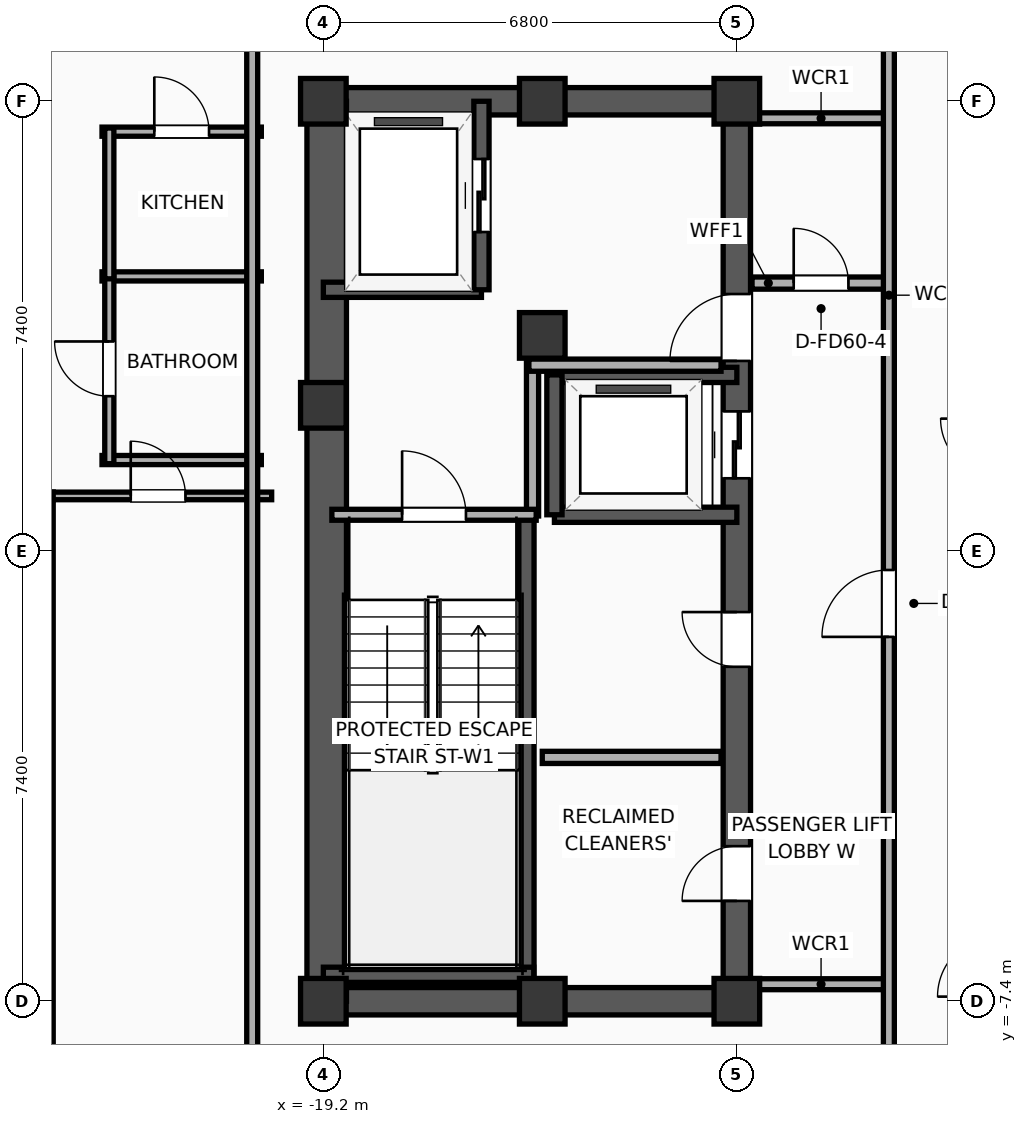
"""IFC4 building model, lengths in metres.
Left out: names, types, materials, properties, quantities, classifications, styles, units other than length and angle.
Written with IfcOpenShell. Run it as: python <this file> out.ifc"""

import sys

from ifc_helpers import new_model, si_unit, direction, frame, frame_2d, origin, origin_2d, place, context, subcontext, project, spatial, rectangle, extrude, element, fill, save


model = new_model("IFC4")
c1 = context("Model", 3, precision=1e-05, world=origin(), true_north=direction((0.0, 1.0)))
c2 = subcontext(c1, "Body", "Model", "MODEL_VIEW")
j1 = project(units=[si_unit("LENGTHUNIT", "METRE"), si_unit("PLANEANGLEUNIT", "RADIAN")], contexts=[c1])
p1 = place(None, origin())
s1 = spatial("IfcSite", under=j1, at=p1, CompositionType="ELEMENT")
p2 = place(p1, origin())
s2 = spatial("IfcBuilding", under=s1, at=p2, CompositionType="ELEMENT")
p3 = place(p2, frame((0.0, 0.0, 299.0)))
s3 = spatial("IfcBuildingStorey", under=s2, at=p3, CompositionType="ELEMENT", Elevation=299.0)
for number, where, z_axis, x_axis in (
    (1, (-19.2, -7.4, 0.0), (0.0, 0.0, 1.0), (1.0, 0.0, 0.0)),
    (2, (-19.2, 2.4, 0.0), (0.0, 0.0, 1.0), (1.0, 0.0, 0.0)),
    (3, (-19.2, 7.4, 0.0), (0.0, 0.0, 1.0), (1.0, 0.0, 0.0)),
    (4, (-15.6, -7.4, 0.0), (0.0, 0.0, 1.0), (1.0, 0.0, 0.0)),
    (5, (-15.6, 7.4, 0.0), (0.0, 0.0, 1.0), (1.0, 0.0, 0.0)),
    (6, (-12.4, -7.4, 0.0), (0.0, 0.0, 1.0), (1.0, 0.0, 0.0)),
    (7, (-15.6, 3.55, 0.0), (0.0, 0.0, 1.0), (1.0, 0.0, 0.0)),
    (8, (-12.4, 7.4, 0.0), (0.0, 0.0, 1.0), (1.0, 0.0, 0.0)),
):
    element("IfcColumn", number, at=place(p3, frame(where, z_axis=z_axis, x_axis=x_axis)), inside=s3, PredefinedType="COLUMN", context=c2, shape_type="SweptSolid", body=[
        extrude(rectangle(XDim=0.75, YDim=0.75, at=origin_2d()), origin(), (0.0, 0.0, 1.0), 3.9),
    ])
for number, where, z_axis, x_axis in (
    (9, (-19.425, -7.4, 0.0), (0.0, 0.0, 1.0), (1.0, 0.0, 0.0)),
    (10, (-19.425, 7.4, 0.0), (0.0, 0.0, 1.0), (1.0, 0.0, 0.0)),
):
    element("IfcWall", number, at=place(p3, frame(where, z_axis=z_axis, x_axis=x_axis)), inside=s3, PredefinedType="SHEAR", context=c2, shape_type="SweptSolid", body=[
        extrude(rectangle(XDim=7.25, YDim=0.45, at=frame_2d((3.625, 0.0))), origin(), (0.0, 0.0, 1.0), 3.635),
    ])
p4 = place(p3, frame((-19.145, -7.4, 0.0), z_axis=(0.0, 0.0, 1.0), x_axis=(0.0, 1.0, 0.0)))
e11 = element("IfcWall", 11, at=p4, inside=s3, PredefinedType="SHEAR", context=c2, shape_type="SweptSolid", body=[
    extrude(rectangle(XDim=14.8, YDim=0.65, at=frame_2d((7.4, 0.0))), origin(), (0.0, 0.0, 1.0), 3.635),
])
p5 = place(p3, frame((-12.4, -7.4, 0.0), z_axis=(0.0, 0.0, 1.0), x_axis=(0.0, 1.0, 0.0)))
e12 = element("IfcWall", 12, at=p5, inside=s3, PredefinedType="SHEAR", context=c2, shape_type="SweptSolid", body=[
    extrude(rectangle(XDim=14.8, YDim=0.45, at=frame_2d((7.4, 0.0))), origin(), (0.0, 0.0, 1.0), 3.635),
])
p6 = place(p5, frame((8.6, 0.0, 0.0)))
e13 = element("IfcOpeningElement", 13, at=p6, cuts=e12, PredefinedType="OPENING", context=c2, shape_type="SweptSolid", body=[
    extrude(rectangle(XDim=1.1, YDim=2.05, at=frame_2d((0.55, 1.025))), frame((0.0, 0.235, 0.0), z_axis=(0.0, -1.0, 0.0), x_axis=(1.0, 0.0, 0.0)), (0.0, 0.0, 1.0), 0.47),
])
p7 = place(p5, frame((10.53, 0.0, 0.0)))
e14 = element("IfcOpeningElement", 14, at=p7, cuts=e12, PredefinedType="OPENING", context=c2, shape_type="SweptSolid", body=[
    extrude(rectangle(XDim=1.1, YDim=2.05, at=frame_2d((0.55, 1.025))), frame((0.0, 0.235, 0.0), z_axis=(0.0, -1.0, 0.0), x_axis=(1.0, 0.0, 0.0)), (0.0, 0.0, 1.0), 0.47),
])
p8 = place(p5, frame((1.65, 0.0, 0.0)))
e15 = element("IfcOpeningElement", 15, at=p8, cuts=e12, PredefinedType="OPENING", context=c2, shape_type="SweptSolid", body=[
    extrude(rectangle(XDim=0.9, YDim=2.05, at=frame_2d((0.45, 1.025))), frame((0.0, 0.235, 0.0), z_axis=(0.0, -1.0, 0.0), x_axis=(1.0, 0.0, 0.0)), (0.0, 0.0, 1.0), 0.47),
])
p9 = place(p5, frame((5.5, 0.0, 0.0)))
e16 = element("IfcOpeningElement", 16, at=p9, cuts=e12, PredefinedType="OPENING", context=c2, shape_type="SweptSolid", body=[
    extrude(rectangle(XDim=0.9, YDim=2.05, at=frame_2d((0.45, 1.025))), frame((0.0, 0.235, 0.0), z_axis=(0.0, -1.0, 0.0), x_axis=(1.0, 0.0, 0.0)), (0.0, 0.0, 1.0), 0.47),
])
p10 = place(p3, frame((-15.86, -7.085, 0.0), z_axis=(0.0, 0.0, 1.0), x_axis=(0.0, 1.0, 0.0)))
e17 = element("IfcWall", 17, at=p10, inside=s3, PredefinedType="SOLIDWALL", context=c2, shape_type="SweptSolid", body=[
    extrude(rectangle(XDim=7.685, YDim=0.25, at=frame_2d((3.843, 0.0))), origin(), (0.0, 0.0, 1.0), 3.635),
])
p11 = place(p3, frame((-19.2, -6.965, 0.0), z_axis=(0.0, 0.0, 1.0), x_axis=(1.0, 0.0, 0.0)))
e18 = element("IfcWall", 18, at=p11, inside=s3, PredefinedType="SOLIDWALL", context=c2, shape_type="SweptSolid", body=[
    extrude(rectangle(XDim=3.46, YDim=0.25, at=frame_2d((1.73, 0.0))), origin(), (0.0, 0.0, 1.0), 3.635),
])
p12 = place(p3, frame((-19.2, 4.3, 0.0), z_axis=(0.0, 0.0, 1.0), x_axis=(1.0, 0.0, 0.0)))
e19 = element("IfcWall", 19, at=p12, inside=s3, PredefinedType="SOLIDWALL", context=c2, shape_type="SweptSolid", body=[
    extrude(rectangle(XDim=2.6, YDim=0.25, at=frame_2d((1.3, 0.0))), origin(), (0.0, 0.0, 1.0), 3.635),
])
p13 = place(p3, frame((-16.6, 4.3, 0.0), z_axis=(0.0, 0.0, 1.0), x_axis=(0.0, 1.0, 0.0)))
e20 = element("IfcWall", 20, at=p13, inside=s3, PredefinedType="SOLIDWALL", context=c2, shape_type="SweptSolid", body=[
    extrude(rectangle(XDim=3.1, YDim=0.25, at=frame_2d((1.55, 0.0))), origin(), (0.0, 0.0, 1.0), 3.635),
])
p14 = place(p13, frame((0.95, 0.0, 0.0)))
e21 = element("IfcOpeningElement", 21, at=p14, cuts=e20, PredefinedType="OPENING", context=c2, shape_type="SweptSolid", body=[
    extrude(rectangle(XDim=1.2, YDim=2.05, at=frame_2d((0.6, 1.025))), frame((0.0, 0.135, 0.0), z_axis=(0.0, -1.0, 0.0), x_axis=(1.0, 0.0, 0.0)), (0.0, 0.0, 1.0), 0.27),
])
for number, where, z_axis, x_axis in (
    (22, (-15.4, 0.6, 0.0), (0.0, 0.0, 1.0), (1.0, 0.0, 0.0)),
    (23, (-12.4, 2.9, 0.0), (0.0, 0.0, 1.0), (-1.0, 0.0, 0.0)),
):
    element("IfcWall", number, at=place(p3, frame(where, z_axis=z_axis, x_axis=x_axis)), inside=s3, PredefinedType="SOLIDWALL", context=c2, shape_type="SweptSolid", body=[
        extrude(rectangle(XDim=3.0, YDim=0.25, at=frame_2d((1.5, 0.0))), origin(), (0.0, 0.0, 1.0), 3.635),
    ])
p15 = place(p3, frame((-15.4, 2.9, 0.0), z_axis=(0.0, 0.0, 1.0), x_axis=(0.0, -1.0, 0.0)))
e24 = element("IfcWall", 24, at=p15, inside=s3, PredefinedType="SOLIDWALL", context=c2, shape_type="SweptSolid", body=[
    extrude(rectangle(XDim=2.3, YDim=0.25, at=frame_2d((1.15, 0.0))), origin(), (0.0, 0.0, 1.0), 3.635),
])
p16 = place(p3, frame((-15.76, 0.58, 0.0), z_axis=(0.0, 0.0, 1.0), x_axis=(0.0, 1.0, 0.0)))
e25 = element("IfcWall", 25, at=p16, inside=s3, PredefinedType="PARTITIONING", context=c2, shape_type="SweptSolid", body=[
    extrude(rectangle(XDim=2.52, YDim=0.2, at=frame_2d((1.26, 0.0))), origin(), (0.0, 0.0, 1.0), 3.635),
])
p17 = place(p3, frame((-15.82, 3.06, 0.0), z_axis=(0.0, 0.0, 1.0), x_axis=(1.0, 0.0, 0.0)))
e26 = element("IfcWall", 26, at=p17, inside=s3, PredefinedType="PARTITIONING", context=c2, shape_type="SweptSolid", body=[
    extrude(rectangle(XDim=3.16, YDim=0.2, at=frame_2d((1.58, 0.0))), origin(), (0.0, 0.0, 1.0), 3.635),
])
p18 = place(p3, frame((-19.06, 0.6, 0.0), z_axis=(0.0, 0.0, 1.0), x_axis=(1.0, 0.0, 0.0)))
e27 = element("IfcWall", 27, at=p18, inside=s3, PredefinedType="PARTITIONING", context=c2, shape_type="SweptSolid", body=[
    extrude(rectangle(XDim=3.36, YDim=0.18, at=frame_2d((1.68, 0.0))), origin(), (0.0, 0.0, 1.0), 3.635),
])
p19 = place(p18, frame((1.155, 0.0, 0.0)))
e28 = element("IfcOpeningElement", 28, at=p19, cuts=e27, PredefinedType="OPENING", context=c2, shape_type="SweptSolid", body=[
    extrude(rectangle(XDim=1.05, YDim=2.05, at=frame_2d((0.525, 1.025))), frame((0.0, 0.1, 0.0), z_axis=(0.0, -1.0, 0.0), x_axis=(1.0, 0.0, 0.0)), (0.0, 0.0, 1.0), 0.2),
])
p20 = place(p3, frame((-15.6, -3.39, 0.0), z_axis=(0.0, 0.0, 1.0), x_axis=(1.0, 0.0, 0.0)))
e29 = element("IfcWall", 29, at=p20, inside=s3, PredefinedType="PARTITIONING", context=c2, shape_type="SweptSolid", body=[
    extrude(rectangle(XDim=2.94, YDim=0.2, at=frame_2d((1.47, 0.0))), origin(), (0.0, 0.0, 1.0), 3.635),
])
p21 = place(p3, frame((-12.15, 4.41, 0.0), z_axis=(0.0, 0.0, 1.0), x_axis=(1.0, 0.0, 0.0)))
e30 = element("IfcWall", 30, at=p21, inside=s3, PredefinedType="PARTITIONING", context=c2, shape_type="SweptSolid", body=[
    extrude(rectangle(XDim=2.27, YDim=0.2, at=frame_2d((1.135, 0.0))), origin(), (0.0, 0.0, 1.0), 3.635),
])
p22 = place(p21, frame((0.685, 0.0, 0.0)))
e31 = element("IfcOpeningElement", 31, at=p22, cuts=e30, PredefinedType="OPENING", context=c2, shape_type="SweptSolid", body=[
    extrude(rectangle(XDim=0.9, YDim=2.05, at=frame_2d((0.45, 1.025))), frame((0.0, 0.11, 0.0), z_axis=(0.0, -1.0, 0.0), x_axis=(1.0, 0.0, 0.0)), (0.0, 0.0, 1.0), 0.22),
])
for number, where, z_axis, x_axis in (
    (32, (-12.15, 7.12, 0.0), (0.0, 0.0, 1.0), (1.0, 0.0, 0.0)),
    (33, (-12.15, -7.12, 0.0), (0.0, 0.0, 1.0), (1.0, 0.0, 0.0)),
):
    element("IfcWall", number, at=place(p3, frame(where, z_axis=z_axis, x_axis=x_axis)), inside=s3, PredefinedType="PARTITIONING", context=c2, shape_type="SweptSolid", body=[
        extrude(rectangle(XDim=2.27, YDim=0.18, at=frame_2d((1.135, 0.0))), origin(), (0.0, 0.0, 1.0), 3.635),
    ])
p23 = place(p3, frame((-9.9, -8.58, 0.0), z_axis=(0.0, 0.0, 1.0), x_axis=(0.0, 1.0, 0.0)))
e34 = element("IfcWall", 34, at=p23, inside=s3, PredefinedType="PARTITIONING", context=c2, shape_type="SweptSolid", body=[
    extrude(rectangle(XDim=17.16, YDim=0.18, at=frame_2d((8.58, 0.0))), origin(), (0.0, 0.0, 1.0), 3.635),
])
p24 = place(p23, frame((7.172, 0.0, 0.0)))
e35 = element("IfcOpeningElement", 35, at=p24, cuts=e34, PredefinedType="OPENING", context=c2, shape_type="SweptSolid", body=[
    extrude(rectangle(XDim=1.1, YDim=2.05, at=frame_2d((0.55, 1.025))), frame((0.0, 0.1, 0.0), z_axis=(0.0, -1.0, 0.0), x_axis=(1.0, 0.0, 0.0)), (0.0, 0.0, 1.0), 0.2),
])
p25 = place(p3, frame((-22.84, 6.9, 0.0), z_axis=(0.0, 0.0, 1.0), x_axis=(1.0, 0.0, 0.0)))
e36 = element("IfcWall", 36, at=p25, inside=s3, PredefinedType="PLUMBINGWALL", context=c2, shape_type="SweptSolid", body=[
    extrude(rectangle(XDim=2.62, YDim=0.15, at=frame_2d((1.31, 0.0))), origin(), (0.0, 0.0, 1.0), 3.635),
])
p26 = place(p25, frame((0.86, 0.0, 0.0)))
e37 = element("IfcOpeningElement", 37, at=p26, cuts=e36, PredefinedType="OPENING", context=c2, shape_type="SweptSolid", body=[
    extrude(rectangle(XDim=0.9, YDim=2.05, at=frame_2d((0.45, 1.025))), frame((0.0, 0.085, 0.0), z_axis=(0.0, -1.0, 0.0), x_axis=(1.0, 0.0, 0.0)), (0.0, 0.0, 1.0), 0.17),
])
for number, where, z_axis, x_axis in (
    (38, (-22.84, 4.52, 0.0), (0.0, 0.0, 1.0), (1.0, 0.0, 0.0)),
    (39, (-22.84, 1.5, 0.0), (0.0, 0.0, 1.0), (1.0, 0.0, 0.0)),
):
    element("IfcWall", number, at=place(p3, frame(where, z_axis=z_axis, x_axis=x_axis)), inside=s3, PredefinedType="PLUMBINGWALL", context=c2, shape_type="SweptSolid", body=[
        extrude(rectangle(XDim=2.62, YDim=0.15, at=frame_2d((1.31, 0.0))), origin(), (0.0, 0.0, 1.0), 3.635),
    ])
p27 = place(p3, frame((-22.72, 1.44, 0.0), z_axis=(0.0, 0.0, 1.0), x_axis=(0.0, 1.0, 0.0)))
e40 = element("IfcWall", 40, at=p27, inside=s3, PredefinedType="PLUMBINGWALL", context=c2, shape_type="SweptSolid", body=[
    extrude(rectangle(XDim=3.12, YDim=0.15, at=frame_2d((1.56, 0.0))), origin(), (0.0, 0.0, 1.0), 3.635),
])
p28 = place(p27, frame((1.11, 0.0, 0.0)))
e41 = element("IfcOpeningElement", 41, at=p28, cuts=e40, PredefinedType="OPENING", context=c2, shape_type="SweptSolid", body=[
    extrude(rectangle(XDim=0.9, YDim=2.05, at=frame_2d((0.45, 1.025))), frame((0.0, 0.085, 0.0), z_axis=(0.0, -1.0, 0.0), x_axis=(1.0, 0.0, 0.0)), (0.0, 0.0, 1.0), 0.17),
])
p29 = place(p3, frame((-22.72, 4.48, 0.0), z_axis=(0.0, 0.0, 1.0), x_axis=(0.0, 1.0, 0.0)))
e42 = element("IfcWall", 42, at=p29, inside=s3, PredefinedType="PLUMBINGWALL", context=c2, shape_type="SweptSolid", body=[
    extrude(rectangle(XDim=2.48, YDim=0.15, at=frame_2d((1.24, 0.0))), origin(), (0.0, 0.0, 1.0), 3.635),
])
p30 = place(p3, frame((-27.104, 0.91, 0.0), z_axis=(0.0, 0.0, 1.0), x_axis=(1.0, 0.0, 0.0)))
e43 = element("IfcWall", 43, at=p30, inside=s3, PredefinedType="PARTITIONING", context=c2, shape_type="SweptSolid", body=[
    extrude(rectangle(XDim=3.461, YDim=0.125, at=frame_2d((1.73, 0.0))), origin(), (0.0, 0.0, 1.0), 3.635),
])
p31 = place(p30, frame((1.281, 0.0, 0.0)))
e44 = element("IfcOpeningElement", 44, at=p31, cuts=e43, PredefinedType="OPENING", context=c2, shape_type="SweptSolid", body=[
    extrude(rectangle(XDim=0.9, YDim=2.05, at=frame_2d((0.45, 1.025))), frame((0.0, 0.073, 0.0), z_axis=(0.0, -1.0, 0.0), x_axis=(1.0, 0.0, 0.0)), (0.0, 0.0, 1.0), 0.145),
])
p32 = place(p3, frame((-23.768, 0.91, 0.0), z_axis=(0.0, 0.0, 1.0), x_axis=(1.0, 0.0, 0.0)))
e45 = element("IfcWall", 45, at=p32, inside=s3, PredefinedType="PARTITIONING", context=c2, shape_type="SweptSolid", body=[
    extrude(rectangle(XDim=3.718, YDim=0.125, at=frame_2d((1.859, 0.0))), origin(), (0.0, 0.0, 1.0), 3.635),
])
p33 = place(p32, frame((1.4, 0.0, 0.0)))
e46 = element("IfcOpeningElement", 46, at=p33, cuts=e45, PredefinedType="OPENING", context=c2, shape_type="SweptSolid", body=[
    extrude(rectangle(XDim=0.9, YDim=2.05, at=frame_2d((0.45, 1.025))), frame((0.0, 0.073, 0.0), z_axis=(0.0, -1.0, 0.0), x_axis=(1.0, 0.0, 0.0)), (0.0, 0.0, 1.0), 0.145),
])
p34 = place(p3, frame((-23.705, -8.81, 0.0), z_axis=(0.0, 0.0, 1.0), x_axis=(0.0, 1.0, 0.0)))
e47 = element("IfcWall", 47, at=p34, inside=s3, PredefinedType="PARTITIONING", context=c2, shape_type="SweptSolid", body=[
    extrude(rectangle(XDim=9.78, YDim=0.125, at=frame_2d((4.89, 0.0))), origin(), (0.0, 0.0, 1.0), 3.635),
])
p35 = place(p3, frame((-20.37, -8.61, 0.0), z_axis=(0.0, 0.0, 1.0), x_axis=(0.0, 1.0, 0.0)))
e48 = element("IfcWall", 48, at=p35, inside=s3, PredefinedType="PARTITIONING", context=c2, shape_type="SweptSolid", body=[
    extrude(rectangle(XDim=17.22, YDim=0.18, at=frame_2d((8.61, 0.0))), origin(), (0.0, 0.0, 1.0), 3.635),
])
p36 = place(p14, origin())
e49 = element("IfcDoor", 49, at=p36, inside=s3, OperationType="SLIDING_TO_LEFT", PredefinedType="DOOR", context=c2, shape_type="SweptSolid", body=[
    extrude(rectangle(XDim=1.2, YDim=2.05, at=frame_2d((0.6, 1.025))), frame((0.0, 0.025, 0.0), z_axis=(0.0, -1.0, 0.0), x_axis=(1.0, 0.0, 0.0)), (0.0, 0.0, 1.0), 0.05),
])
fill(e21, e49)
p37 = place(p6, origin())
e50 = element("IfcDoor", 50, at=p37, inside=s3, OperationType="SLIDING_TO_LEFT", PredefinedType="DOOR", context=c2, shape_type="SweptSolid", body=[
    extrude(rectangle(XDim=1.1, YDim=2.05, at=frame_2d((0.55, 1.025))), frame((0.0, 0.025, 0.0), z_axis=(0.0, -1.0, 0.0), x_axis=(1.0, 0.0, 0.0)), (0.0, 0.0, 1.0), 0.05),
])
fill(e13, e50)
p38 = place(p19, origin())
e51 = element("IfcDoor", 51, at=p38, inside=s3, OperationType="SINGLE_SWING_LEFT", PredefinedType="DOOR", context=c2, shape_type="SweptSolid", body=[
    extrude(rectangle(XDim=1.05, YDim=2.05, at=frame_2d((0.525, 1.025))), frame((0.0, 0.025, 0.0), z_axis=(0.0, -1.0, 0.0), x_axis=(1.0, 0.0, 0.0)), (0.0, 0.0, 1.0), 0.05),
])
fill(e28, e51)
p39 = place(p22, origin())
e52 = element("IfcDoor", 52, at=p39, inside=s3, OperationType="SINGLE_SWING_LEFT", PredefinedType="DOOR", context=c2, shape_type="SweptSolid", body=[
    extrude(rectangle(XDim=0.9, YDim=2.05, at=frame_2d((0.45, 1.025))), frame((0.0, 0.025, 0.0), z_axis=(0.0, -1.0, 0.0), x_axis=(1.0, 0.0, 0.0)), (0.0, 0.0, 1.0), 0.05),
])
fill(e31, e52)
p40 = place(p24, origin())
e53 = element("IfcDoor", 53, at=p40, inside=s3, OperationType="SINGLE_SWING_LEFT", PredefinedType="DOOR", context=c2, shape_type="SweptSolid", body=[
    extrude(rectangle(XDim=1.1, YDim=2.05, at=frame_2d((0.55, 1.025))), frame((0.0, 0.025, 0.0), z_axis=(0.0, -1.0, 0.0), x_axis=(1.0, 0.0, 0.0)), (0.0, 0.0, 1.0), 0.05),
])
fill(e35, e53)
p41 = place(p26, origin())
e54 = element("IfcDoor", 54, at=p41, inside=s3, OperationType="SINGLE_SWING_LEFT", PredefinedType="DOOR", context=c2, shape_type="SweptSolid", body=[
    extrude(rectangle(XDim=0.9, YDim=2.05, at=frame_2d((0.45, 1.025))), frame((0.0, 0.025, 0.0), z_axis=(0.0, -1.0, 0.0), x_axis=(1.0, 0.0, 0.0)), (0.0, 0.0, 1.0), 0.05),
])
fill(e37, e54)
p42 = place(p28, origin())
e55 = element("IfcDoor", 55, at=p42, inside=s3, OperationType="SINGLE_SWING_RIGHT", PredefinedType="DOOR", context=c2, shape_type="SweptSolid", body=[
    extrude(rectangle(XDim=0.9, YDim=2.05, at=frame_2d((0.45, 1.025))), frame((0.0, 0.025, 0.0), z_axis=(0.0, -1.0, 0.0), x_axis=(1.0, 0.0, 0.0)), (0.0, 0.0, 1.0), 0.05),
])
fill(e41, e55)
p43 = place(p33, origin())
e56 = element("IfcDoor", 56, at=p43, inside=s3, OperationType="SINGLE_SWING_LEFT", PredefinedType="DOOR", context=c2, shape_type="SweptSolid", body=[
    extrude(rectangle(XDim=0.9, YDim=2.05, at=frame_2d((0.45, 1.025))), frame((0.0, 0.025, 0.0), z_axis=(0.0, -1.0, 0.0), x_axis=(1.0, 0.0, 0.0)), (0.0, 0.0, 1.0), 0.05),
])
fill(e46, e56)
p44 = place(p7, origin())
e57 = element("IfcDoor", 57, at=p44, inside=s3, OperationType="SINGLE_SWING_LEFT", PredefinedType="DOOR", context=c2, shape_type="SweptSolid", body=[
    extrude(rectangle(XDim=1.1, YDim=2.05, at=frame_2d((0.55, 1.025))), frame((0.0, 0.025, 0.0), z_axis=(0.0, -1.0, 0.0), x_axis=(1.0, 0.0, 0.0)), (0.0, 0.0, 1.0), 0.05),
])
fill(e14, e57)
p45 = place(p8, origin())
e58 = element("IfcDoor", 58, at=p45, inside=s3, OperationType="SINGLE_SWING_LEFT", PredefinedType="DOOR", context=c2, shape_type="SweptSolid", body=[
    extrude(rectangle(XDim=0.9, YDim=2.05, at=frame_2d((0.45, 1.025))), frame((0.0, 0.025, 0.0), z_axis=(0.0, -1.0, 0.0), x_axis=(1.0, 0.0, 0.0)), (0.0, 0.0, 1.0), 0.05),
])
fill(e15, e58)
p46 = place(p9, origin())
e59 = element("IfcDoor", 59, at=p46, inside=s3, OperationType="SINGLE_SWING_RIGHT", PredefinedType="DOOR", context=c2, shape_type="SweptSolid", body=[
    extrude(rectangle(XDim=0.9, YDim=2.05, at=frame_2d((0.45, 1.025))), frame((0.0, 0.025, 0.0), z_axis=(0.0, -1.0, 0.0), x_axis=(1.0, 0.0, 0.0)), (0.0, 0.0, 1.0), 0.05),
])
fill(e16, e59)
save(model, sys.argv[1])
